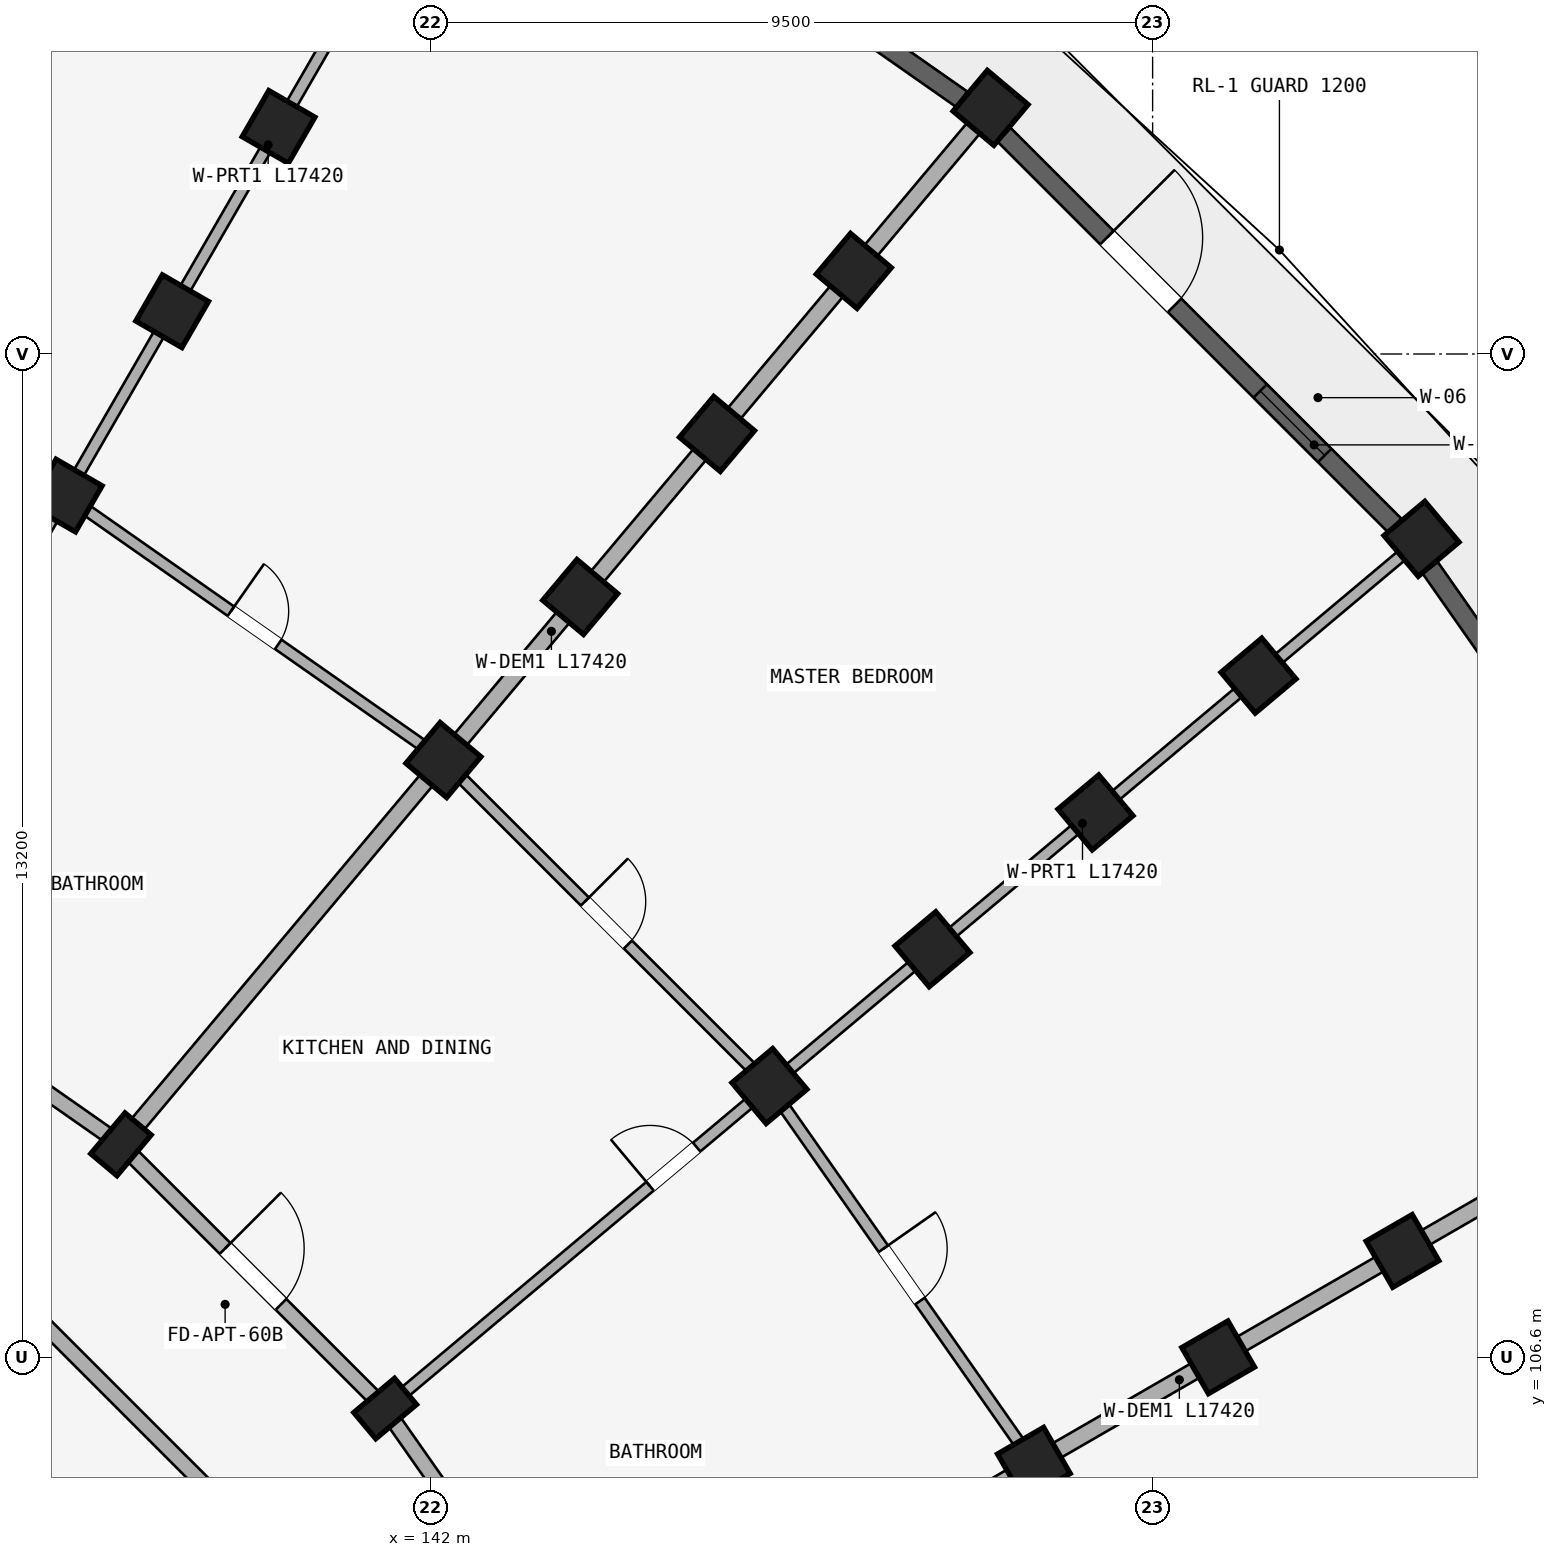
"""IFC4 building model, lengths in metres.
Left out: names, types, materials, properties, quantities, classifications, styles, units other than length and angle.
Written with IfcOpenShell. Run it as: python <this file> out.ifc"""

import sys

from ifc_helpers import new_model, si_unit, direction, frame, frame_2d, origin, origin_2d, place, context, subcontext, project, spatial, rectangle, extrude, element, fill, save


model = new_model("IFC4")
c1 = context("Model", 3, precision=1e-05, world=origin(), true_north=direction((0.0, 1.0)))
c2 = subcontext(c1, "Body", "Model", "MODEL_VIEW")
j1 = project(units=[si_unit("LENGTHUNIT", "METRE"), si_unit("PLANEANGLEUNIT", "RADIAN")], contexts=[c1])
p1 = place(None, origin())
s1 = spatial("IfcSite", under=j1, at=p1, CompositionType="ELEMENT")
p2 = place(p1, origin())
s2 = spatial("IfcBuilding", under=s1, at=p2, CompositionType="ELEMENT")
p3 = place(p2, frame((0.0, 0.0, 18.15)))
s3 = spatial("IfcBuildingStorey", under=s2, at=p3, CompositionType="ELEMENT", Elevation=18.15)
for number, where, z_axis, x_axis in (
    (1, (137.2, 117.938, 0.0), (0.0, 0.0, 1.0), (-0.866, 0.5, 0.0)),
    (2, (138.6, 120.363, 0.0), (0.0, 0.0, 1.0), (-0.866, 0.5, 0.0)),
    (3, (140.0, 122.787, 0.0), (0.0, 0.0, 1.0), (-0.866, 0.5, 0.0)),
):
    element("IfcColumn", number, at=place(p3, frame(where, z_axis=z_axis, x_axis=x_axis)), inside=s3, PredefinedType="COLUMN", context=c2, shape_type="SweptSolid", body=[
        extrude(rectangle(XDim=0.7, YDim=0.7, at=origin_2d()), origin(), (0.0, 0.0, 1.0), 2.93),
    ])
p4 = place(p3, frame((137.927, 109.402, 0.0), z_axis=(0.0, 0.0, 1.0), x_axis=(-0.766044443119, 0.642787609687, 0.0)))
e4 = element("IfcColumn", 4, at=p4, inside=s3, PredefinedType="COLUMN", context=c2, shape_type="SweptSolid", body=[
    extrude(rectangle(XDim=0.45, YDim=0.7, at=origin_2d()), origin(), (0.0, 0.0, 1.0), 2.93),
])
for number, where, z_axis, x_axis in (
    (5, (142.169, 114.458, 0.0), (0.0, 0.0, 1.0), (-0.766, 0.643, 0.0)),
    (6, (143.969, 116.603, 0.0), (0.0, 0.0, 1.0), (-0.766, 0.643, 0.0)),
    (7, (145.769, 118.748, 0.0), (0.0, 0.0, 1.0), (-0.766, 0.643, 0.0)),
    (8, (147.568, 120.893, 0.0), (0.0, 0.0, 1.0), (-0.766, 0.643, 0.0)),
    (9, (149.368, 123.038, 0.0), (0.0, 0.0, 1.0), (-0.766, 0.643, 0.0)),
):
    element("IfcColumn", number, at=place(p3, frame(where, z_axis=z_axis, x_axis=x_axis)), inside=s3, PredefinedType="COLUMN", context=c2, shape_type="SweptSolid", body=[
        extrude(rectangle(XDim=0.7, YDim=0.7, at=origin_2d()), origin(), (0.0, 0.0, 1.0), 2.93),
    ])
p5 = place(p3, frame((141.402, 105.927, 0.0), z_axis=(0.0, 0.0, 1.0), x_axis=(-0.642787609687, 0.766044443119, 0.0)))
e10 = element("IfcColumn", 10, at=p5, inside=s3, PredefinedType="COLUMN", context=c2, shape_type="SweptSolid", body=[
    extrude(rectangle(XDim=0.45, YDim=0.7, at=origin_2d()), origin(), (0.0, 0.0, 1.0), 2.93),
])
for number, where, z_axis, x_axis in (
    (11, (146.458, 110.169, 0.0), (0.0, 0.0, 1.0), (-0.643, 0.766, 0.0)),
    (12, (148.603, 111.969, 0.0), (0.0, 0.0, 1.0), (-0.643, 0.766, 0.0)),
    (13, (150.748, 113.769, 0.0), (0.0, 0.0, 1.0), (-0.643, 0.766, 0.0)),
    (14, (152.893, 115.568, 0.0), (0.0, 0.0, 1.0), (-0.643, 0.766, 0.0)),
    (15, (155.038, 117.368, 0.0), (0.0, 0.0, 1.0), (-0.643, 0.766, 0.0)),
    (16, (149.938, 105.2, 0.0), (0.0, 0.0, 1.0), (-0.5, 0.866, 0.0)),
    (17, (152.363, 106.6, 0.0), (0.0, 0.0, 1.0), (-0.5, 0.866, 0.0)),
    (18, (154.787, 108.0, 0.0), (0.0, 0.0, 1.0), (-0.5, 0.866, 0.0)),
):
    element("IfcColumn", number, at=place(p3, frame(where, z_axis=z_axis, x_axis=x_axis)), inside=s3, PredefinedType="COLUMN", context=c2, shape_type="SweptSolid", body=[
        extrude(rectangle(XDim=0.7, YDim=0.7, at=origin_2d()), origin(), (0.0, 0.0, 1.0), 2.93),
    ])
p6 = place(p3, frame((133.9, 112.222, 0.0), z_axis=(0.0, 0.0, 1.0), x_axis=(0.819140911474, -0.573592335331, 0.0)))
e19 = element("IfcWall", 19, at=p6, inside=s3, PredefinedType="STANDARD", context=c2, shape_type="SweptSolid", body=[
    extrude(rectangle(XDim=4.916, YDim=0.2, at=frame_2d((2.458, 0.0))), origin(), (0.0, 0.0, 1.0), 2.372),
])
p7 = place(p3, frame((136.384, 107.564, 0.0), z_axis=(0.0, 0.0, 1.0), x_axis=(0.707106781187, -0.707106781187, 0.0)))
e20 = element("IfcWall", 20, at=p7, inside=s3, PredefinedType="STANDARD", context=c2, shape_type="SweptSolid", body=[
    extrude(rectangle(XDim=4.497, YDim=0.2, at=frame_2d((2.249, 0.0))), origin(), (0.0, 0.0, 1.0), 2.372),
])
p8 = place(p3, frame((137.927, 109.402, 0.0), z_axis=(0.0, 0.0, 1.0), x_axis=(0.707106781187, -0.707106781187, 0.0)))
e21 = element("IfcWall", 21, at=p8, inside=s3, PredefinedType="STANDARD", context=c2, shape_type="SweptSolid", body=[
    extrude(rectangle(XDim=4.916, YDim=0.2, at=frame_2d((2.458, 0.0))), origin(), (0.0, 0.0, 1.0), 2.372),
])
p9 = place(p8, frame((1.938, 0.0, 0.0)))
e22 = element("IfcOpeningElement", 22, at=p9, cuts=e21, PredefinedType="OPENING", context=c2, shape_type="SweptSolid", body=[
    extrude(rectangle(XDim=1.04, YDim=2.15, at=frame_2d((0.52, 1.075))), frame((0.0, 0.11, 0.0), z_axis=(0.0, -1.0, 0.0), x_axis=(1.0, 0.0, 0.0)), (0.0, 0.0, 1.0), 0.22),
])
p10 = place(p3, frame((141.402, 105.927, 0.0), z_axis=(0.0, 0.0, 1.0), x_axis=(0.573592335331, -0.819140911474, 0.0)))
e23 = element("IfcWall", 23, at=p10, inside=s3, PredefinedType="STANDARD", context=c2, shape_type="SweptSolid", body=[
    extrude(rectangle(XDim=4.916, YDim=0.2, at=frame_2d((2.458, 0.0))), origin(), (0.0, 0.0, 1.0), 2.372),
])
p11 = place(p3, frame((133.95, 112.309, 0.0), z_axis=(0.0, 0.0, 1.0), x_axis=(0.499997843263, 0.866026648973, 0.0)))
e24 = element("IfcWall", 24, at=p11, inside=s3, PredefinedType="PARTITIONING", context=c2, shape_type="SweptSolid", body=[
    extrude(rectangle(XDim=17.42, YDim=0.15, at=frame_2d((8.71, 0.0))), origin(), (0.0, 0.0, 1.0), 2.372),
])
p12 = place(p11, frame((4.45, 0.0, 0.0)))
e25 = element("IfcOpeningElement", 25, at=p12, cuts=e24, PredefinedType="OPENING", context=c2, shape_type="SweptSolid", body=[
    extrude(rectangle(XDim=0.8, YDim=2.1, at=frame_2d((0.4, 1.05))), frame((0.0, 0.085, 0.0), z_axis=(0.0, -1.0, 0.0), x_axis=(1.0, 0.0, 0.0)), (0.0, 0.0, 1.0), 0.17),
])
p13 = place(p3, frame((137.991, 109.479, 0.0), z_axis=(0.0, 0.0, 1.0), x_axis=(0.642784757967, 0.766046835987, 0.0)))
e26 = element("IfcWall", 26, at=p13, inside=s3, PredefinedType="STANDARD", context=c2, shape_type="SweptSolid", body=[
    extrude(rectangle(XDim=17.42, YDim=0.22, at=frame_2d((8.71, 0.0))), origin(), (0.0, 0.0, 1.0), 2.372),
])
p14 = place(p3, frame((141.479, 105.991, 0.0), z_axis=(0.0, 0.0, 1.0), x_axis=(0.766046835987, 0.642784757967, 0.0)))
e27 = element("IfcWall", 27, at=p14, inside=s3, PredefinedType="PARTITIONING", context=c2, shape_type="SweptSolid", body=[
    extrude(rectangle(XDim=17.42, YDim=0.15, at=frame_2d((8.71, 0.0))), origin(), (0.0, 0.0, 1.0), 2.372),
])
p15 = place(p14, frame((4.45, 0.0, 0.0)))
e28 = element("IfcOpeningElement", 28, at=p15, cuts=e27, PredefinedType="OPENING", context=c2, shape_type="SweptSolid", body=[
    extrude(rectangle(XDim=0.8, YDim=2.1, at=frame_2d((0.4, 1.05))), frame((0.0, 0.085, 0.0), z_axis=(0.0, -1.0, 0.0), x_axis=(1.0, 0.0, 0.0)), (0.0, 0.0, 1.0), 0.17),
])
p16 = place(p3, frame((144.309, 101.95, 0.0), z_axis=(0.0, 0.0, 1.0), x_axis=(0.866026648973, 0.499997843263, 0.0)))
e29 = element("IfcWall", 29, at=p16, inside=s3, PredefinedType="STANDARD", context=c2, shape_type="SweptSolid", body=[
    extrude(rectangle(XDim=17.42, YDim=0.22, at=frame_2d((8.71, 0.0))), origin(), (0.0, 0.0, 1.0), 2.372),
])
p17 = place(p3, frame((131.702, 120.501, 0.0), z_axis=(0.0, 0.0, 1.0), x_axis=(0.906312656069, -0.42260781991, 0.0)))
e30 = element("IfcWall", 30, at=p17, inside=s3, PredefinedType="PLUMBINGWALL", context=c2, shape_type="SweptSolid", body=[
    extrude(rectangle(XDim=6.066, YDim=0.15, at=frame_2d((3.033, 0.0))), origin(), (0.0, 0.0, 1.0), 2.372),
])
p18 = place(p17, frame((2.613, 0.0, 0.0)))
e31 = element("IfcOpeningElement", 31, at=p18, cuts=e30, PredefinedType="OPENING", context=c2, shape_type="SweptSolid", body=[
    extrude(rectangle(XDim=0.84, YDim=2.1, at=frame_2d((0.42, 1.05))), frame((0.0, 0.085, 0.0), z_axis=(0.0, -1.0, 0.0), x_axis=(1.0, 0.0, 0.0)), (0.0, 0.0, 1.0), 0.17),
])
p19 = place(p3, frame((137.2, 117.938, 0.0), z_axis=(0.0, 0.0, 1.0), x_axis=(0.81913926159, -0.573594691504, 0.0)))
e32 = element("IfcWall", 32, at=p19, inside=s3, PredefinedType="PLUMBINGWALL", context=c2, shape_type="SweptSolid", body=[
    extrude(rectangle(XDim=6.066, YDim=0.15, at=frame_2d((3.033, 0.0))), origin(), (0.0, 0.0, 1.0), 2.372),
])
p20 = place(p19, frame((2.653, 0.0, 0.0)))
e33 = element("IfcOpeningElement", 33, at=p20, cuts=e32, PredefinedType="OPENING", context=c2, shape_type="SweptSolid", body=[
    extrude(rectangle(XDim=0.76, YDim=2.05, at=frame_2d((0.38, 1.025))), frame((0.0, 0.085, 0.0), z_axis=(0.0, -1.0, 0.0), x_axis=(1.0, 0.0, 0.0)), (0.0, 0.0, 1.0), 0.17),
])
p21 = place(p3, frame((142.169, 114.458, 0.0), z_axis=(0.0, 0.0, 1.0), x_axis=(0.707106781187, -0.707106781187, 0.0)))
e34 = element("IfcWall", 34, at=p21, inside=s3, PredefinedType="PLUMBINGWALL", context=c2, shape_type="SweptSolid", body=[
    extrude(rectangle(XDim=6.066, YDim=0.15, at=frame_2d((3.033, 0.0))), origin(), (0.0, 0.0, 1.0), 2.372),
])
p22 = place(p21, frame((2.633, 0.0, 0.0)))
e35 = element("IfcOpeningElement", 35, at=p22, cuts=e34, PredefinedType="OPENING", context=c2, shape_type="SweptSolid", body=[
    extrude(rectangle(XDim=0.8, YDim=2.1, at=frame_2d((0.4, 1.05))), frame((0.0, 0.085, 0.0), z_axis=(0.0, -1.0, 0.0), x_axis=(1.0, 0.0, 0.0)), (0.0, 0.0, 1.0), 0.17),
])
p23 = place(p3, frame((146.458, 110.169, 0.0), z_axis=(0.0, 0.0, 1.0), x_axis=(0.573594691504, -0.81913926159, 0.0)))
e36 = element("IfcWall", 36, at=p23, inside=s3, PredefinedType="PLUMBINGWALL", context=c2, shape_type="SweptSolid", body=[
    extrude(rectangle(XDim=6.066, YDim=0.15, at=frame_2d((3.033, 0.0))), origin(), (0.0, 0.0, 1.0), 2.372),
])
p24 = place(p23, frame((2.613, 0.0, 0.0)))
e37 = element("IfcOpeningElement", 37, at=p24, cuts=e36, PredefinedType="OPENING", context=c2, shape_type="SweptSolid", body=[
    extrude(rectangle(XDim=0.84, YDim=2.1, at=frame_2d((0.42, 1.05))), frame((0.0, 0.085, 0.0), z_axis=(0.0, -1.0, 0.0), x_axis=(1.0, 0.0, 0.0)), (0.0, 0.0, 1.0), 0.17),
])
p25 = place(p3, frame((149.938, 105.2, 0.0), z_axis=(0.0, 0.0, 1.0), x_axis=(0.42260781991, -0.906312656069, 0.0)))
e38 = element("IfcWall", 38, at=p25, inside=s3, PredefinedType="PLUMBINGWALL", context=c2, shape_type="SweptSolid", body=[
    extrude(rectangle(XDim=6.066, YDim=0.15, at=frame_2d((3.033, 0.0))), origin(), (0.0, 0.0, 1.0), 2.372),
])
p26 = place(p25, frame((2.653, 0.0, 0.0)))
e39 = element("IfcOpeningElement", 39, at=p26, cuts=e38, PredefinedType="OPENING", context=c2, shape_type="SweptSolid", body=[
    extrude(rectangle(XDim=0.76, YDim=2.05, at=frame_2d((0.38, 1.025))), frame((0.0, 0.085, 0.0), z_axis=(0.0, -1.0, 0.0), x_axis=(1.0, 0.0, 0.0)), (0.0, 0.0, 1.0), 0.17),
])
p27 = place(p3, frame((143.036, 127.319, 0.0), z_axis=(0.0, 0.0, 1.0), x_axis=(0.819159308599, -0.573566061701, 0.0)))
e40 = element("IfcWall", 40, at=p27, inside=s3, PredefinedType="STANDARD", context=c2, shape_type="SweptSolid", body=[
    extrude(rectangle(XDim=7.267, YDim=0.25, at=frame_2d((3.633, 0.0))), origin(), (0.0, 0.0, 1.0), 2.372),
])
p28 = place(p27, frame((2.808, 0.0, 0.422)))
e41 = element("IfcOpeningElement", 41, at=p28, cuts=e40, PredefinedType="OPENING", context=c2, shape_type="SweptSolid", body=[
    extrude(rectangle(XDim=1.65, YDim=1.75, at=frame_2d((0.825, 0.875))), frame((0.0, 0.135, 0.0), z_axis=(0.0, -1.0, 0.0), x_axis=(1.0, 0.0, 0.0)), (0.0, 0.0, 1.0), 0.27),
])
p29 = place(p3, frame((149.546, 122.684, 0.0), z_axis=(0.0, 0.0, 1.0), x_axis=(0.707106781187, -0.707106781187, 0.0)))
e42 = element("IfcWall", 42, at=p29, inside=s3, PredefinedType="STANDARD", context=c2, shape_type="SweptSolid", body=[
    extrude(rectangle(XDim=7.267, YDim=0.25, at=frame_2d((3.633, 0.0))), origin(), (0.0, 0.0, 1.0), 2.372),
])
p30 = place(p29, frame((4.766, 0.0, 0.522)))
e43 = element("IfcOpeningElement", 43, at=p30, cuts=e42, PredefinedType="OPENING", context=c2, shape_type="SweptSolid", body=[
    extrude(rectangle(XDim=1.2, YDim=1.5, at=frame_2d((0.6, 0.75))), frame((0.0, 0.135, 0.0), z_axis=(0.0, -1.0, 0.0), x_axis=(1.0, 0.0, 0.0)), (0.0, 0.0, 1.0), 0.27),
])
p31 = place(p29, frame((1.913, 0.0, 0.0)))
e44 = element("IfcOpeningElement", 44, at=p31, cuts=e42, PredefinedType="OPENING", context=c2, shape_type="SweptSolid", body=[
    extrude(rectangle(XDim=1.26, YDim=2.15, at=frame_2d((0.63, 1.075))), frame((0.0, 0.135, 0.0), z_axis=(0.0, -1.0, 0.0), x_axis=(1.0, 0.0, 0.0)), (0.0, 0.0, 1.0), 0.27),
])
p32 = place(p3, frame((155.151, 116.989, 0.0), z_axis=(0.0, 0.0, 1.0), x_axis=(0.573566061701, -0.819159308599, 0.0)))
e45 = element("IfcWall", 45, at=p32, inside=s3, PredefinedType="STANDARD", context=c2, shape_type="SweptSolid", body=[
    extrude(rectangle(XDim=7.267, YDim=0.25, at=frame_2d((3.633, 0.0))), origin(), (0.0, 0.0, 1.0), 2.372),
])
p33 = place(p32, frame((2.583, 0.0, 0.372)))
e46 = element("IfcOpeningElement", 46, at=p33, cuts=e45, PredefinedType="OPENING", context=c2, shape_type="SweptSolid", body=[
    extrude(rectangle(XDim=2.1, YDim=1.8, at=frame_2d((1.05, 0.9))), frame((0.0, 0.135, 0.0), z_axis=(0.0, -1.0, 0.0), x_axis=(1.0, 0.0, 0.0)), (0.0, 0.0, 1.0), 0.27),
])
p34 = place(p30, origin())
e47 = element("IfcWindow", 47, at=p34, inside=s3, PartitioningType="SINGLE_PANEL", PredefinedType="WINDOW", context=c2, shape_type="SweptSolid", body=[
    extrude(rectangle(XDim=1.2, YDim=1.5, at=frame_2d((0.6, 0.75))), frame((0.0, 0.03, 0.0), z_axis=(0.0, -1.0, 0.0), x_axis=(1.0, 0.0, 0.0)), (0.0, 0.0, 1.0), 0.06),
])
fill(e43, e47)
p35 = place(p15, frame((0.8, 0.0, 0.0), z_axis=(0.0, 0.0, 1.0), x_axis=(-1.0, 0.0, 0.0)))
e48 = element("IfcDoor", 48, at=p35, inside=s3, OperationType="SINGLE_SWING_RIGHT", PredefinedType="DOOR", context=c2, shape_type="SweptSolid", body=[
    extrude(rectangle(XDim=0.8, YDim=2.1, at=frame_2d((0.4, 1.05))), frame((0.0, 0.025, 0.0), z_axis=(0.0, -1.0, 0.0), x_axis=(1.0, 0.0, 0.0)), (0.0, 0.0, 1.0), 0.05),
])
fill(e28, e48)
p36 = place(p20, frame((0.76, 0.0, 0.0), z_axis=(0.0, 0.0, 1.0), x_axis=(-1.0, 0.0, 0.0)))
e49 = element("IfcDoor", 49, at=p36, inside=s3, OperationType="SINGLE_SWING_RIGHT", PredefinedType="DOOR", context=c2, shape_type="SweptSolid", body=[
    extrude(rectangle(XDim=0.76, YDim=2.05, at=frame_2d((0.38, 1.025))), frame((0.0, 0.025, 0.0), z_axis=(0.0, -1.0, 0.0), x_axis=(1.0, 0.0, 0.0)), (0.0, 0.0, 1.0), 0.05),
])
fill(e33, e49)
p37 = place(p9, origin())
e50 = element("IfcDoor", 50, at=p37, inside=s3, OperationType="SINGLE_SWING_LEFT", PredefinedType="DOOR", context=c2, shape_type="SweptSolid", body=[
    extrude(rectangle(XDim=1.04, YDim=2.15, at=frame_2d((0.52, 1.075))), frame((0.0, 0.025, 0.0), z_axis=(0.0, -1.0, 0.0), x_axis=(1.0, 0.0, 0.0)), (0.0, 0.0, 1.0), 0.05),
])
fill(e22, e50)
p38 = place(p22, frame((0.8, 0.0, 0.0), z_axis=(0.0, 0.0, 1.0), x_axis=(-1.0, 0.0, 0.0)))
e51 = element("IfcDoor", 51, at=p38, inside=s3, OperationType="SINGLE_SWING_RIGHT", PredefinedType="DOOR", context=c2, shape_type="SweptSolid", body=[
    extrude(rectangle(XDim=0.8, YDim=2.1, at=frame_2d((0.4, 1.05))), frame((0.0, 0.025, 0.0), z_axis=(0.0, -1.0, 0.0), x_axis=(1.0, 0.0, 0.0)), (0.0, 0.0, 1.0), 0.05),
])
fill(e35, e51)
p39 = place(p24, origin())
e52 = element("IfcDoor", 52, at=p39, inside=s3, OperationType="SINGLE_SWING_LEFT", PredefinedType="DOOR", context=c2, shape_type="SweptSolid", body=[
    extrude(rectangle(XDim=0.84, YDim=2.1, at=frame_2d((0.42, 1.05))), frame((0.0, 0.025, 0.0), z_axis=(0.0, -1.0, 0.0), x_axis=(1.0, 0.0, 0.0)), (0.0, 0.0, 1.0), 0.05),
])
fill(e37, e52)
p40 = place(p31, origin())
e53 = element("IfcDoor", 53, at=p40, inside=s3, OperationType="SINGLE_SWING_LEFT", PredefinedType="DOOR", context=c2, shape_type="SweptSolid", body=[
    extrude(rectangle(XDim=1.26, YDim=2.15, at=frame_2d((0.63, 1.075))), frame((0.0, 0.025, 0.0), z_axis=(0.0, -1.0, 0.0), x_axis=(1.0, 0.0, 0.0)), (0.0, 0.0, 1.0), 0.05),
])
fill(e44, e53)
save(model, sys.argv[1])
